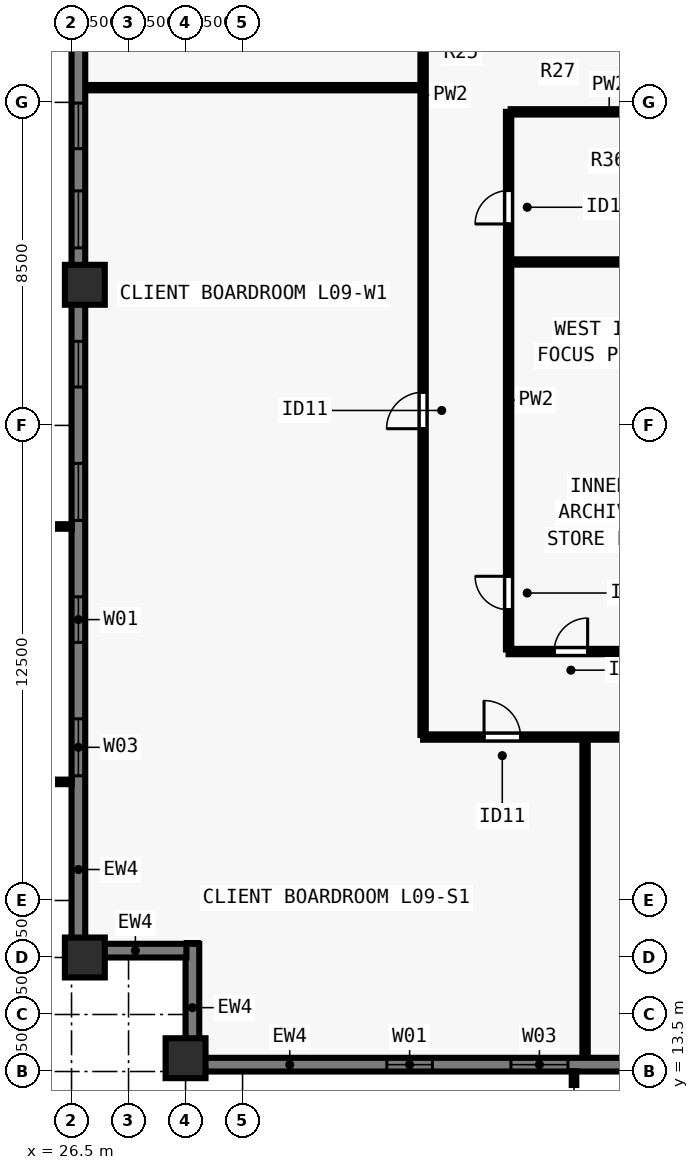
"""IFC4 building model, lengths in metres.
Left out: names, types, materials, properties, quantities, classifications, styles, units other than length and angle.
Written with IfcOpenShell. Run it as: python <this file> out.ifc"""

import sys

from ifc_helpers import new_model, si_unit, direction, frame, frame_2d, origin, origin_2d, place, context, subcontext, project, spatial, rectangle, extrude, element, fill, save


model = new_model("IFC4")
c1 = context("Model", 3, precision=1e-05, world=origin(), true_north=direction((0.0, 1.0)))
c2 = subcontext(c1, "Body", "Model", "MODEL_VIEW")
j1 = project(units=[si_unit("LENGTHUNIT", "METRE"), si_unit("PLANEANGLEUNIT", "RADIAN")], contexts=[c1])
p1 = place(None, origin())
s1 = spatial("IfcSite", under=j1, at=p1, CompositionType="ELEMENT")
p2 = place(p1, origin())
s2 = spatial("IfcBuilding", under=s1, at=p2, CompositionType="ELEMENT")
p3 = place(p2, frame((0.0, 0.0, 37.5)))
s3 = spatial("IfcBuildingStorey", under=s2, at=p3, CompositionType="ELEMENT", Elevation=37.5)
for number, where, z_axis, x_axis in (
    (1, (29.5, 13.85, 0.0), (0.0, 0.0, 1.0), (1.0, 0.0, 0.0)),
    (2, (26.85, 34.2, 0.0), (0.0, 0.0, 1.0), (0.0, 1.0, 0.0)),
    (3, (26.85, 16.5, 0.0), (0.0, 0.0, 1.0), (0.0, 1.0, 0.0)),
):
    element("IfcColumn", number, at=place(p3, frame(where, z_axis=z_axis, x_axis=x_axis)), inside=s3, PredefinedType="COLUMN", context=c2, shape_type="SweptSolid", body=[
        extrude(rectangle(XDim=1.05, YDim=1.05, at=origin_2d()), origin(), (0.0, 0.0, 1.0), 3.5),
    ])
p4 = place(p3, frame((48.6, 13.68, 0.0), z_axis=(0.0, 0.0, 1.0), x_axis=(-1.0, 0.0, 0.0)))
e4 = element("IfcWall", 4, at=p4, inside=s3, PredefinedType="SOLIDWALL", context=c2, shape_type="SweptSolid", body=[
    extrude(rectangle(XDim=18.762, YDim=0.36, at=frame_2d((9.381, 0.0))), origin(), (0.0, 0.0, 1.0), 3.28),
])
p5 = place(p4, frame((2.208, 0.0, 0.8)))
e5 = element("IfcOpeningElement", 5, at=p5, cuts=e4, PredefinedType="OPENING", context=c2, shape_type="SweptSolid", body=[
    extrude(rectangle(XDim=1.5, YDim=1.544, at=frame_2d((0.75, 0.772))), frame((0.0, 0.19, 0.0), z_axis=(0.0, -1.0, 0.0), x_axis=(1.0, 0.0, 0.0)), (0.0, 0.0, 1.0), 0.38),
])
p6 = place(p4, frame((5.773, 0.0, 0.8)))
e6 = element("IfcOpeningElement", 6, at=p6, cuts=e4, PredefinedType="OPENING", context=c2, shape_type="SweptSolid", body=[
    extrude(rectangle(XDim=1.2, YDim=1.544, at=frame_2d((0.6, 0.772))), frame((0.0, 0.19, 0.0), z_axis=(0.0, -1.0, 0.0), x_axis=(1.0, 0.0, 0.0)), (0.0, 0.0, 1.0), 0.38),
])
p7 = place(p4, frame((9.039, 0.0, 0.8)))
e7 = element("IfcOpeningElement", 7, at=p7, cuts=e4, PredefinedType="OPENING", context=c2, shape_type="SweptSolid", body=[
    extrude(rectangle(XDim=1.5, YDim=1.544, at=frame_2d((0.75, 0.772))), frame((0.0, 0.19, 0.0), z_axis=(0.0, -1.0, 0.0), x_axis=(1.0, 0.0, 0.0)), (0.0, 0.0, 1.0), 0.38),
])
p8 = place(p4, frame((12.604, 0.0, 0.8)))
e8 = element("IfcOpeningElement", 8, at=p8, cuts=e4, PredefinedType="OPENING", context=c2, shape_type="SweptSolid", body=[
    extrude(rectangle(XDim=1.2, YDim=1.544, at=frame_2d((0.6, 0.772))), frame((0.0, 0.19, 0.0), z_axis=(0.0, -1.0, 0.0), x_axis=(1.0, 0.0, 0.0)), (0.0, 0.0, 1.0), 0.38),
])
p9 = place(p3, frame((29.68, 13.5, 0.0), z_axis=(0.0, 0.0, 1.0), x_axis=(0.0, 1.0, 0.0)))
e9 = element("IfcWall", 9, at=p9, inside=s3, PredefinedType="SOLIDWALL", context=c2, shape_type="SweptSolid", body=[
    extrude(rectangle(XDim=3.36, YDim=0.36, at=frame_2d((1.68, 0.0))), origin(), (0.0, 0.0, 1.0), 3.28),
])
p10 = place(p3, frame((29.522, 16.68, 0.0), z_axis=(0.0, 0.0, 1.0), x_axis=(-1.0, 0.0, 0.0)))
e10 = element("IfcWall", 10, at=p10, inside=s3, PredefinedType="SOLIDWALL", context=c2, shape_type="SweptSolid", body=[
    extrude(rectangle(XDim=2.684, YDim=0.36, at=frame_2d((1.342, 0.0))), origin(), (0.0, 0.0, 1.0), 3.28),
])
p11 = place(p3, frame((26.68, 16.5, 0.0), z_axis=(0.0, 0.0, 1.0), x_axis=(0.0, 1.0, 0.0)))
e11 = element("IfcWall", 11, at=p11, inside=s3, PredefinedType="SOLIDWALL", context=c2, shape_type="SweptSolid", body=[
    extrude(rectangle(XDim=44.662, YDim=0.36, at=frame_2d((22.331, 0.0))), origin(), (0.0, 0.0, 1.0), 3.28),
])
p12 = place(p11, frame((4.78, 0.0, 0.8)))
e12 = element("IfcOpeningElement", 12, at=p12, cuts=e11, PredefinedType="OPENING", context=c2, shape_type="SweptSolid", body=[
    extrude(rectangle(XDim=1.5, YDim=1.544, at=frame_2d((0.75, 0.772))), frame((0.0, 0.19, 0.0), z_axis=(0.0, -1.0, 0.0), x_axis=(1.0, 0.0, 0.0)), (0.0, 0.0, 1.0), 0.38),
])
p13 = place(p11, frame((8.29, 0.0, 0.8)))
e13 = element("IfcOpeningElement", 13, at=p13, cuts=e11, PredefinedType="OPENING", context=c2, shape_type="SweptSolid", body=[
    extrude(rectangle(XDim=1.2, YDim=1.544, at=frame_2d((0.6, 0.772))), frame((0.0, 0.19, 0.0), z_axis=(0.0, -1.0, 0.0), x_axis=(1.0, 0.0, 0.0)), (0.0, 0.0, 1.0), 0.38),
])
p14 = place(p11, frame((11.5, 0.0, 0.8)))
e14 = element("IfcOpeningElement", 14, at=p14, cuts=e11, PredefinedType="OPENING", context=c2, shape_type="SweptSolid", body=[
    extrude(rectangle(XDim=1.5, YDim=1.544, at=frame_2d((0.75, 0.772))), frame((0.0, 0.19, 0.0), z_axis=(0.0, -1.0, 0.0), x_axis=(1.0, 0.0, 0.0)), (0.0, 0.0, 1.0), 0.38),
])
p15 = place(p11, frame((15.01, 0.0, 0.8)))
e15 = element("IfcOpeningElement", 15, at=p15, cuts=e11, PredefinedType="OPENING", context=c2, shape_type="SweptSolid", body=[
    extrude(rectangle(XDim=1.2, YDim=1.544, at=frame_2d((0.6, 0.772))), frame((0.0, 0.19, 0.0), z_axis=(0.0, -1.0, 0.0), x_axis=(1.0, 0.0, 0.0)), (0.0, 0.0, 1.0), 0.38),
])
p16 = place(p11, frame((18.671, 0.0, 0.8)))
e16 = element("IfcOpeningElement", 16, at=p16, cuts=e11, PredefinedType="OPENING", context=c2, shape_type="SweptSolid", body=[
    extrude(rectangle(XDim=1.5, YDim=1.544, at=frame_2d((0.75, 0.772))), frame((0.0, 0.19, 0.0), z_axis=(0.0, -1.0, 0.0), x_axis=(1.0, 0.0, 0.0)), (0.0, 0.0, 1.0), 0.38),
])
p17 = place(p11, frame((21.281, 0.0, 0.8)))
e17 = element("IfcOpeningElement", 17, at=p17, cuts=e11, PredefinedType="OPENING", context=c2, shape_type="SweptSolid", body=[
    extrude(rectangle(XDim=1.2, YDim=1.544, at=frame_2d((0.6, 0.772))), frame((0.0, 0.19, 0.0), z_axis=(0.0, -1.0, 0.0), x_axis=(1.0, 0.0, 0.0)), (0.0, 0.0, 1.0), 0.38),
])
p18 = place(p11, frame((24.941, 0.0, 0.8)))
e18 = element("IfcOpeningElement", 18, at=p18, cuts=e11, PredefinedType="OPENING", context=c2, shape_type="SweptSolid", body=[
    extrude(rectangle(XDim=1.5, YDim=1.544, at=frame_2d((0.75, 0.772))), frame((0.0, 0.19, 0.0), z_axis=(0.0, -1.0, 0.0), x_axis=(1.0, 0.0, 0.0)), (0.0, 0.0, 1.0), 0.38),
])
p19 = place(p11, frame((28.451, 0.0, 0.8)))
e19 = element("IfcOpeningElement", 19, at=p19, cuts=e11, PredefinedType="OPENING", context=c2, shape_type="SweptSolid", body=[
    extrude(rectangle(XDim=1.2, YDim=1.544, at=frame_2d((0.6, 0.772))), frame((0.0, 0.19, 0.0), z_axis=(0.0, -1.0, 0.0), x_axis=(1.0, 0.0, 0.0)), (0.0, 0.0, 1.0), 0.38),
])
p20 = place(p11, frame((31.662, 0.0, 0.8)))
e20 = element("IfcOpeningElement", 20, at=p20, cuts=e11, PredefinedType="OPENING", context=c2, shape_type="SweptSolid", body=[
    extrude(rectangle(XDim=1.5, YDim=1.544, at=frame_2d((0.75, 0.772))), frame((0.0, 0.19, 0.0), z_axis=(0.0, -1.0, 0.0), x_axis=(1.0, 0.0, 0.0)), (0.0, 0.0, 1.0), 0.38),
])
p21 = place(p11, frame((35.172, 0.0, 0.8)))
e21 = element("IfcOpeningElement", 21, at=p21, cuts=e11, PredefinedType="OPENING", context=c2, shape_type="SweptSolid", body=[
    extrude(rectangle(XDim=1.2, YDim=1.544, at=frame_2d((0.6, 0.772))), frame((0.0, 0.19, 0.0), z_axis=(0.0, -1.0, 0.0), x_axis=(1.0, 0.0, 0.0)), (0.0, 0.0, 1.0), 0.38),
])
p22 = place(p11, frame((38.382, 0.0, 0.8)))
e22 = element("IfcOpeningElement", 22, at=p22, cuts=e11, PredefinedType="OPENING", context=c2, shape_type="SweptSolid", body=[
    extrude(rectangle(XDim=1.5, YDim=1.544, at=frame_2d((0.75, 0.772))), frame((0.0, 0.19, 0.0), z_axis=(0.0, -1.0, 0.0), x_axis=(1.0, 0.0, 0.0)), (0.0, 0.0, 1.0), 0.38),
])
p23 = place(p3, frame((35.75, 22.3, 0.0), z_axis=(0.0, 0.0, 1.0), x_axis=(1.0, 0.0, 0.0)))
e23 = element("IfcWall", 23, at=p23, inside=s3, PredefinedType="PARTITIONING", context=c2, shape_type="SweptSolid", body=[
    extrude(rectangle(XDim=32.5, YDim=0.14, at=frame_2d((16.25, 0.0))), origin(), (0.0, 0.0, 1.0), 3.28),
])
p24 = place(p23, frame((1.604, 0.0, 0.0)))
e24 = element("IfcOpeningElement", 24, at=p24, cuts=e23, PredefinedType="OPENING", context=c2, shape_type="SweptSolid", body=[
    extrude(rectangle(XDim=0.96, YDim=2.12, at=frame_2d((0.48, 1.06))), frame((0.0, 0.08, 0.0), z_axis=(0.0, -1.0, 0.0), x_axis=(1.0, 0.0, 0.0)), (0.0, 0.0, 1.0), 0.16),
])
p25 = place(p23, frame((9.585, 0.0, 0.0)))
e25 = element("IfcOpeningElement", 25, at=p25, cuts=e23, PredefinedType="OPENING", context=c2, shape_type="SweptSolid", body=[
    extrude(rectangle(XDim=0.96, YDim=2.12, at=frame_2d((0.48, 1.06))), frame((0.0, 0.08, 0.0), z_axis=(0.0, -1.0, 0.0), x_axis=(1.0, 0.0, 0.0)), (0.0, 0.0, 1.0), 0.16),
])
p26 = place(p23, frame((22.125, 0.0, 0.0)))
e26 = element("IfcOpeningElement", 26, at=p26, cuts=e23, PredefinedType="OPENING", context=c2, shape_type="SweptSolid", body=[
    extrude(rectangle(XDim=0.96, YDim=2.12, at=frame_2d((0.48, 1.06))), frame((0.0, 0.08, 0.0), z_axis=(0.0, -1.0, 0.0), x_axis=(1.0, 0.0, 0.0)), (0.0, 0.0, 1.0), 0.16),
])
p27 = place(p23, frame((31.18, 0.0, 0.0)))
e27 = element("IfcOpeningElement", 27, at=p27, cuts=e23, PredefinedType="OPENING", context=c2, shape_type="SweptSolid", body=[
    extrude(rectangle(XDim=0.96, YDim=2.12, at=frame_2d((0.48, 1.06))), frame((0.0, 0.08, 0.0), z_axis=(0.0, -1.0, 0.0), x_axis=(1.0, 0.0, 0.0)), (0.0, 0.0, 1.0), 0.16),
])
p28 = place(p3, frame((35.75, 22.355, 0.0), z_axis=(0.0, 0.0, 1.0), x_axis=(0.0, 1.0, 0.0)))
e28 = element("IfcWall", 28, at=p28, inside=s3, PredefinedType="PARTITIONING", context=c2, shape_type="SweptSolid", body=[
    extrude(rectangle(XDim=33.29, YDim=0.14, at=frame_2d((16.645, 0.0))), origin(), (0.0, 0.0, 1.0), 3.28),
])
p29 = place(p28, frame((8.058, 0.0, 0.0)))
e29 = element("IfcOpeningElement", 29, at=p29, cuts=e28, PredefinedType="OPENING", context=c2, shape_type="SweptSolid", body=[
    extrude(rectangle(XDim=0.96, YDim=2.12, at=frame_2d((0.48, 1.06))), frame((0.0, 0.08, 0.0), z_axis=(0.0, -1.0, 0.0), x_axis=(1.0, 0.0, 0.0)), (0.0, 0.0, 1.0), 0.16),
])
p30 = place(p28, frame((24.658, 0.0, 0.0)))
e30 = element("IfcOpeningElement", 30, at=p30, cuts=e28, PredefinedType="OPENING", context=c2, shape_type="SweptSolid", body=[
    extrude(rectangle(XDim=0.96, YDim=2.12, at=frame_2d((0.48, 1.06))), frame((0.0, 0.08, 0.0), z_axis=(0.0, -1.0, 0.0), x_axis=(1.0, 0.0, 0.0)), (0.0, 0.0, 1.0), 0.16),
])
p31 = place(p3, frame((38.0, 24.55, 0.0), z_axis=(0.0, 0.0, 1.0), x_axis=(1.0, 0.0, 0.0)))
e31 = element("IfcWall", 31, at=p31, inside=s3, PredefinedType="PARTITIONING", context=c2, shape_type="SweptSolid", body=[
    extrude(rectangle(XDim=28.0, YDim=0.14, at=frame_2d((14.0, 0.0))), origin(), (0.0, 0.0, 1.0), 3.28),
])
p32 = place(p31, frame((1.2, 0.0, 0.0)))
e32 = element("IfcOpeningElement", 32, at=p32, cuts=e31, PredefinedType="OPENING", context=c2, shape_type="SweptSolid", body=[
    extrude(rectangle(XDim=0.88, YDim=2.1, at=frame_2d((0.44, 1.05))), frame((0.0, 0.08, 0.0), z_axis=(0.0, -1.0, 0.0), x_axis=(1.0, 0.0, 0.0)), (0.0, 0.0, 1.0), 0.16),
])
p33 = place(p31, frame((10.5, 0.0, 0.0)))
e33 = element("IfcOpeningElement", 33, at=p33, cuts=e31, PredefinedType="OPENING", context=c2, shape_type="SweptSolid", body=[
    extrude(rectangle(XDim=0.88, YDim=2.1, at=frame_2d((0.44, 1.05))), frame((0.0, 0.08, 0.0), z_axis=(0.0, -1.0, 0.0), x_axis=(1.0, 0.0, 0.0)), (0.0, 0.0, 1.0), 0.16),
])
p34 = place(p31, frame((21.0, 0.0, 0.0)))
e34 = element("IfcOpeningElement", 34, at=p34, cuts=e31, PredefinedType="OPENING", context=c2, shape_type="SweptSolid", body=[
    extrude(rectangle(XDim=0.88, YDim=2.1, at=frame_2d((0.44, 1.05))), frame((0.0, 0.08, 0.0), z_axis=(0.0, -1.0, 0.0), x_axis=(1.0, 0.0, 0.0)), (0.0, 0.0, 1.0), 0.16),
])
p35 = place(p3, frame((38.0, 24.605, 0.0), z_axis=(0.0, 0.0, 1.0), x_axis=(0.0, 1.0, 0.0)))
e35 = element("IfcWall", 35, at=p35, inside=s3, PredefinedType="PARTITIONING", context=c2, shape_type="SweptSolid", body=[
    extrude(rectangle(XDim=14.145, YDim=0.14, at=frame_2d((7.073, 0.0))), origin(), (0.0, 0.0, 1.0), 3.28),
])
p36 = place(p35, frame((1.045, 0.0, 0.0)))
e36 = element("IfcOpeningElement", 36, at=p36, cuts=e35, PredefinedType="OPENING", context=c2, shape_type="SweptSolid", body=[
    extrude(rectangle(XDim=0.88, YDim=2.1, at=frame_2d((0.44, 1.05))), frame((0.0, 0.08, 0.0), z_axis=(0.0, -1.0, 0.0), x_axis=(1.0, 0.0, 0.0)), (0.0, 0.0, 1.0), 0.16),
])
p37 = place(p35, frame((11.195, 0.0, 0.0)))
e37 = element("IfcOpeningElement", 37, at=p37, cuts=e35, PredefinedType="OPENING", context=c2, shape_type="SweptSolid", body=[
    extrude(rectangle(XDim=0.88, YDim=2.1, at=frame_2d((0.44, 1.05))), frame((0.0, 0.08, 0.0), z_axis=(0.0, -1.0, 0.0), x_axis=(1.0, 0.0, 0.0)), (0.0, 0.0, 1.0), 0.16),
])
for number, where, z_axis, x_axis in (
    (38, (38.055, 38.75, 0.0), (0.0, 0.0, 1.0), (1.0, 0.0, 0.0)),
    (39, (38.055, 34.8, 0.0), (0.0, 0.0, 1.0), (1.0, 0.0, 0.0)),
):
    element("IfcWall", number, at=place(p3, frame(where, z_axis=z_axis, x_axis=x_axis)), inside=s3, PredefinedType="PARTITIONING", context=c2, shape_type="SweptSolid", body=[
        extrude(rectangle(XDim=5.185, YDim=0.14, at=frame_2d((2.593, 0.0))), origin(), (0.0, 0.0, 1.0), 3.28),
    ])
p38 = place(p3, frame((40.012, 13.92, 0.0), z_axis=(0.0, 0.0, 1.0), x_axis=(0.0, 1.0, 0.0)))
e40 = element("IfcWall", 40, at=p38, inside=s3, PredefinedType="PARTITIONING", context=c2, shape_type="SweptSolid", body=[
    extrude(rectangle(XDim=8.28, YDim=0.14, at=frame_2d((4.14, 0.0))), origin(), (0.0, 0.0, 1.0), 3.28),
])
p39 = place(p3, frame((26.92, 39.387, 0.0), z_axis=(0.0, 0.0, 1.0), x_axis=(1.0, 0.0, 0.0)))
e41 = element("IfcWall", 41, at=p39, inside=s3, PredefinedType="PARTITIONING", context=c2, shape_type="SweptSolid", body=[
    extrude(rectangle(XDim=8.73, YDim=0.14, at=frame_2d((4.365, 0.0))), origin(), (0.0, 0.0, 1.0), 2.849),
])
p40 = place(p7, origin())
e42 = element("IfcWindow", 42, at=p40, inside=s3, PartitioningType="SINGLE_PANEL", PredefinedType="WINDOW", context=c2, shape_type="SweptSolid", body=[
    extrude(rectangle(XDim=1.5, YDim=1.544, at=frame_2d((0.75, 0.772))), frame((0.0, -0.05, 0.0), z_axis=(0.0, -1.0, 0.0), x_axis=(1.0, 0.0, 0.0)), (0.0, 0.0, 1.0), 0.06),
])
fill(e7, e42)
p41 = place(p8, origin())
e43 = element("IfcWindow", 43, at=p41, inside=s3, PartitioningType="SINGLE_PANEL", PredefinedType="WINDOW", context=c2, shape_type="SweptSolid", body=[
    extrude(rectangle(XDim=1.2, YDim=1.544, at=frame_2d((0.6, 0.772))), frame((0.0, -0.05, 0.0), z_axis=(0.0, -1.0, 0.0), x_axis=(1.0, 0.0, 0.0)), (0.0, 0.0, 1.0), 0.06),
])
fill(e8, e43)
p42 = place(p12, origin())
e44 = element("IfcWindow", 44, at=p42, inside=s3, PartitioningType="SINGLE_PANEL", PredefinedType="WINDOW", context=c2, shape_type="SweptSolid", body=[
    extrude(rectangle(XDim=1.5, YDim=1.544, at=frame_2d((0.75, 0.772))), frame((0.0, -0.05, 0.0), z_axis=(0.0, -1.0, 0.0), x_axis=(1.0, 0.0, 0.0)), (0.0, 0.0, 1.0), 0.06),
])
fill(e12, e44)
p43 = place(p13, origin())
e45 = element("IfcWindow", 45, at=p43, inside=s3, PartitioningType="SINGLE_PANEL", PredefinedType="WINDOW", context=c2, shape_type="SweptSolid", body=[
    extrude(rectangle(XDim=1.2, YDim=1.544, at=frame_2d((0.6, 0.772))), frame((0.0, -0.05, 0.0), z_axis=(0.0, -1.0, 0.0), x_axis=(1.0, 0.0, 0.0)), (0.0, 0.0, 1.0), 0.06),
])
fill(e13, e45)
p44 = place(p14, origin())
e46 = element("IfcWindow", 46, at=p44, inside=s3, PartitioningType="SINGLE_PANEL", PredefinedType="WINDOW", context=c2, shape_type="SweptSolid", body=[
    extrude(rectangle(XDim=1.5, YDim=1.544, at=frame_2d((0.75, 0.772))), frame((0.0, -0.05, 0.0), z_axis=(0.0, -1.0, 0.0), x_axis=(1.0, 0.0, 0.0)), (0.0, 0.0, 1.0), 0.06),
])
fill(e14, e46)
p45 = place(p15, origin())
e47 = element("IfcWindow", 47, at=p45, inside=s3, PartitioningType="SINGLE_PANEL", PredefinedType="WINDOW", context=c2, shape_type="SweptSolid", body=[
    extrude(rectangle(XDim=1.2, YDim=1.544, at=frame_2d((0.6, 0.772))), frame((0.0, -0.05, 0.0), z_axis=(0.0, -1.0, 0.0), x_axis=(1.0, 0.0, 0.0)), (0.0, 0.0, 1.0), 0.06),
])
fill(e15, e47)
p46 = place(p16, origin())
e48 = element("IfcWindow", 48, at=p46, inside=s3, PartitioningType="SINGLE_PANEL", PredefinedType="WINDOW", context=c2, shape_type="SweptSolid", body=[
    extrude(rectangle(XDim=1.5, YDim=1.544, at=frame_2d((0.75, 0.772))), frame((0.0, -0.05, 0.0), z_axis=(0.0, -1.0, 0.0), x_axis=(1.0, 0.0, 0.0)), (0.0, 0.0, 1.0), 0.06),
])
fill(e16, e48)
p47 = place(p17, origin())
e49 = element("IfcWindow", 49, at=p47, inside=s3, PartitioningType="SINGLE_PANEL", PredefinedType="WINDOW", context=c2, shape_type="SweptSolid", body=[
    extrude(rectangle(XDim=1.2, YDim=1.544, at=frame_2d((0.6, 0.772))), frame((0.0, -0.05, 0.0), z_axis=(0.0, -1.0, 0.0), x_axis=(1.0, 0.0, 0.0)), (0.0, 0.0, 1.0), 0.06),
])
fill(e17, e49)
p48 = place(p32, origin())
e50 = element("IfcDoor", 50, at=p48, inside=s3, OperationType="SINGLE_SWING_RIGHT", PredefinedType="DOOR", context=c2, shape_type="SweptSolid", body=[
    extrude(rectangle(XDim=0.88, YDim=2.1, at=frame_2d((0.44, 1.05))), frame((0.0, 0.025, 0.0), z_axis=(0.0, -1.0, 0.0), x_axis=(1.0, 0.0, 0.0)), (0.0, 0.0, 1.0), 0.05),
])
fill(e32, e50)
p49 = place(p36, origin())
e51 = element("IfcDoor", 51, at=p49, inside=s3, OperationType="SINGLE_SWING_RIGHT", PredefinedType="DOOR", context=c2, shape_type="SweptSolid", body=[
    extrude(rectangle(XDim=0.88, YDim=2.1, at=frame_2d((0.44, 1.05))), frame((0.0, 0.025, 0.0), z_axis=(0.0, -1.0, 0.0), x_axis=(1.0, 0.0, 0.0)), (0.0, 0.0, 1.0), 0.05),
])
fill(e36, e51)
p50 = place(p37, origin())
e52 = element("IfcDoor", 52, at=p50, inside=s3, OperationType="SINGLE_SWING_LEFT", PredefinedType="DOOR", context=c2, shape_type="SweptSolid", body=[
    extrude(rectangle(XDim=0.88, YDim=2.1, at=frame_2d((0.44, 1.05))), frame((0.0, 0.025, 0.0), z_axis=(0.0, -1.0, 0.0), x_axis=(1.0, 0.0, 0.0)), (0.0, 0.0, 1.0), 0.05),
])
fill(e37, e52)
p51 = place(p24, origin())
e53 = element("IfcDoor", 53, at=p51, inside=s3, OperationType="SINGLE_SWING_LEFT", PredefinedType="DOOR", context=c2, shape_type="SweptSolid", body=[
    extrude(rectangle(XDim=0.96, YDim=2.12, at=frame_2d((0.48, 1.06))), frame((0.0, 0.025, 0.0), z_axis=(0.0, -1.0, 0.0), x_axis=(1.0, 0.0, 0.0)), (0.0, 0.0, 1.0), 0.05),
])
fill(e24, e53)
p52 = place(p29, origin())
e54 = element("IfcDoor", 54, at=p52, inside=s3, OperationType="SINGLE_SWING_LEFT", PredefinedType="DOOR", context=c2, shape_type="SweptSolid", body=[
    extrude(rectangle(XDim=0.96, YDim=2.12, at=frame_2d((0.48, 1.06))), frame((0.0, 0.025, 0.0), z_axis=(0.0, -1.0, 0.0), x_axis=(1.0, 0.0, 0.0)), (0.0, 0.0, 1.0), 0.05),
])
fill(e29, e54)
save(model, sys.argv[1])
